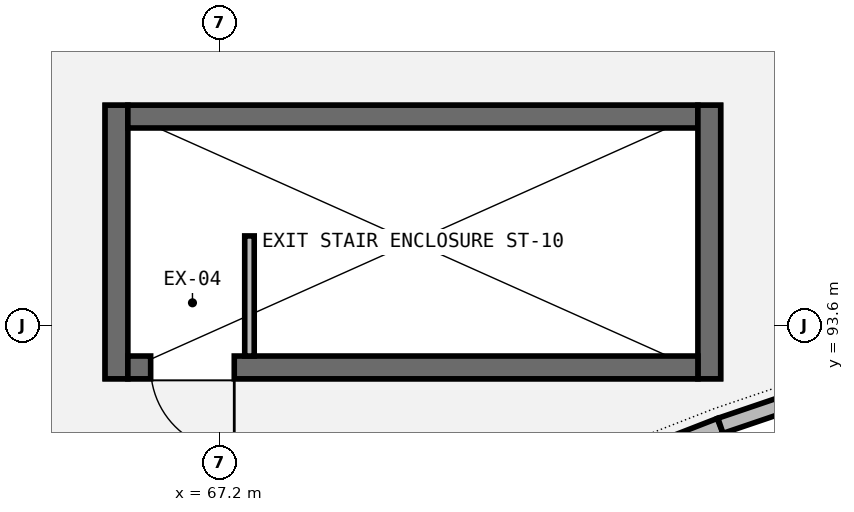
"""IFC4 building model, lengths in metres.
Left out: names, types, materials, properties, quantities, classifications, styles, units other than length and angle.
Written with IfcOpenShell. Run it as: python <this file> out.ifc"""

import sys

from ifc_helpers import new_model, si_unit, direction, frame, frame_2d, origin, place, context, subcontext, project, spatial, rectangle, extrude, element, fill, save


model = new_model("IFC4")
c1 = context("Model", 3, precision=1e-05, world=origin(), true_north=direction((0.0, 1.0)))
c2 = subcontext(c1, "Body", "Model", "MODEL_VIEW")
j1 = project(units=[si_unit("LENGTHUNIT", "METRE"), si_unit("PLANEANGLEUNIT", "RADIAN")], contexts=[c1])
p1 = place(None, origin())
s1 = spatial("IfcSite", under=j1, at=p1, CompositionType="ELEMENT")
p2 = place(p1, origin())
s2 = spatial("IfcBuilding", under=s1, at=p2, CompositionType="ELEMENT")
p3 = place(p2, frame((0.0, 0.0, 23.45)))
s3 = spatial("IfcBuildingStorey", under=s2, at=p3, CompositionType="ELEMENT", Elevation=23.45)
p4 = place(p3, frame((65.85, 92.9, 0.0), z_axis=(0.0, 0.0, 1.0), x_axis=(0.0, 1.0, 0.0)))
e1 = element("IfcWall", 1, at=p4, inside=s3, PredefinedType="SHEAR", context=c2, shape_type="SweptSolid", body=[
    extrude(rectangle(XDim=3.6, YDim=0.3, at=frame_2d((1.8, 0.0))), origin(), (0.0, 0.0, 1.0), 3.2),
])
p5 = place(p3, frame((66.0, 96.35, 0.0), z_axis=(0.0, 0.0, 1.0), x_axis=(1.0, 0.0, 0.0)))
e2 = element("IfcWall", 2, at=p5, inside=s3, PredefinedType="SHEAR", context=c2, shape_type="SweptSolid", body=[
    extrude(rectangle(XDim=7.5, YDim=0.3, at=frame_2d((3.75, 0.0))), origin(), (0.0, 0.0, 1.0), 3.2),
])
p6 = place(p3, frame((73.65, 96.5, 0.0), z_axis=(0.0, 0.0, 1.0), x_axis=(0.0, -1.0, 0.0)))
e3 = element("IfcWall", 3, at=p6, inside=s3, PredefinedType="SHEAR", context=c2, shape_type="SweptSolid", body=[
    extrude(rectangle(XDim=3.6, YDim=0.3, at=frame_2d((1.8, 0.0))), origin(), (0.0, 0.0, 1.0), 3.2),
])
p7 = place(p3, frame((73.5, 93.05, 0.0), z_axis=(0.0, 0.0, 1.0), x_axis=(-1.0, 0.0, 0.0)))
e4 = element("IfcWall", 4, at=p7, inside=s3, PredefinedType="SHEAR", context=c2, shape_type="SweptSolid", body=[
    extrude(rectangle(XDim=7.5, YDim=0.3, at=frame_2d((3.75, 0.0))), origin(), (0.0, 0.0, 1.0), 3.2),
])
p8 = place(p7, frame((6.1, 0.0, 0.0)))
e5 = element("IfcOpeningElement", 5, at=p8, cuts=e4, PredefinedType="OPENING", context=c2, shape_type="SweptSolid", body=[
    extrude(rectangle(XDim=1.1, YDim=2.15, at=frame_2d((0.55, 1.075))), frame((0.0, 0.16, 0.0), z_axis=(0.0, -1.0, 0.0), x_axis=(1.0, 0.0, 0.0)), (0.0, 0.0, 1.0), 0.32),
])
p9 = place(p3, frame((72.227, 91.672, 0.0), z_axis=(0.0, 0.0, 1.0), x_axis=(0.931944632128, 0.362600610379, 0.0)))
e6 = element("IfcWall", 6, at=p9, inside=s3, PredefinedType="PARAPET", context=c2, shape_type="SweptSolid", body=[
    extrude(rectangle(XDim=1.679, YDim=0.21, at=frame_2d((0.84, 0.0))), origin(), (0.0, 0.0, 1.0), 1.2),
])
p10 = place(p3, frame((73.797, 92.282, 0.0), z_axis=(0.0, 0.0, 1.0), x_axis=(0.946924996106, 0.321454587383, 0.0)))
e7 = element("IfcWall", 7, at=p10, inside=s3, PredefinedType="PARAPET", context=c2, shape_type="SweptSolid", body=[
    extrude(rectangle(XDim=1.68, YDim=0.21, at=frame_2d((0.84, 0.0))), origin(), (0.0, 0.0, 1.0), 1.2),
])
p11 = place(p3, frame((67.6, 93.2, 0.0), z_axis=(0.0, 0.0, 1.0), x_axis=(0.0, 1.0, 0.0)))
e8 = element("IfcWall", 8, at=p11, inside=s3, PredefinedType="PARTITIONING", context=c2, shape_type="SweptSolid", body=[
    extrude(rectangle(XDim=1.58, YDim=0.125, at=frame_2d((0.79, 0.0))), origin(), (0.0, 0.0, 1.0), 1.15),
])
p12 = place(p8, origin())
e9 = element("IfcDoor", 9, at=p12, inside=s3, OperationType="SINGLE_SWING_LEFT", PredefinedType="DOOR", context=c2, shape_type="SweptSolid", body=[
    extrude(rectangle(XDim=1.1, YDim=2.15, at=frame_2d((0.55, 1.075))), frame((0.0, 0.025, 0.0), z_axis=(0.0, -1.0, 0.0), x_axis=(1.0, 0.0, 0.0)), (0.0, 0.0, 1.0), 0.05),
])
fill(e5, e9)
save(model, sys.argv[1])
